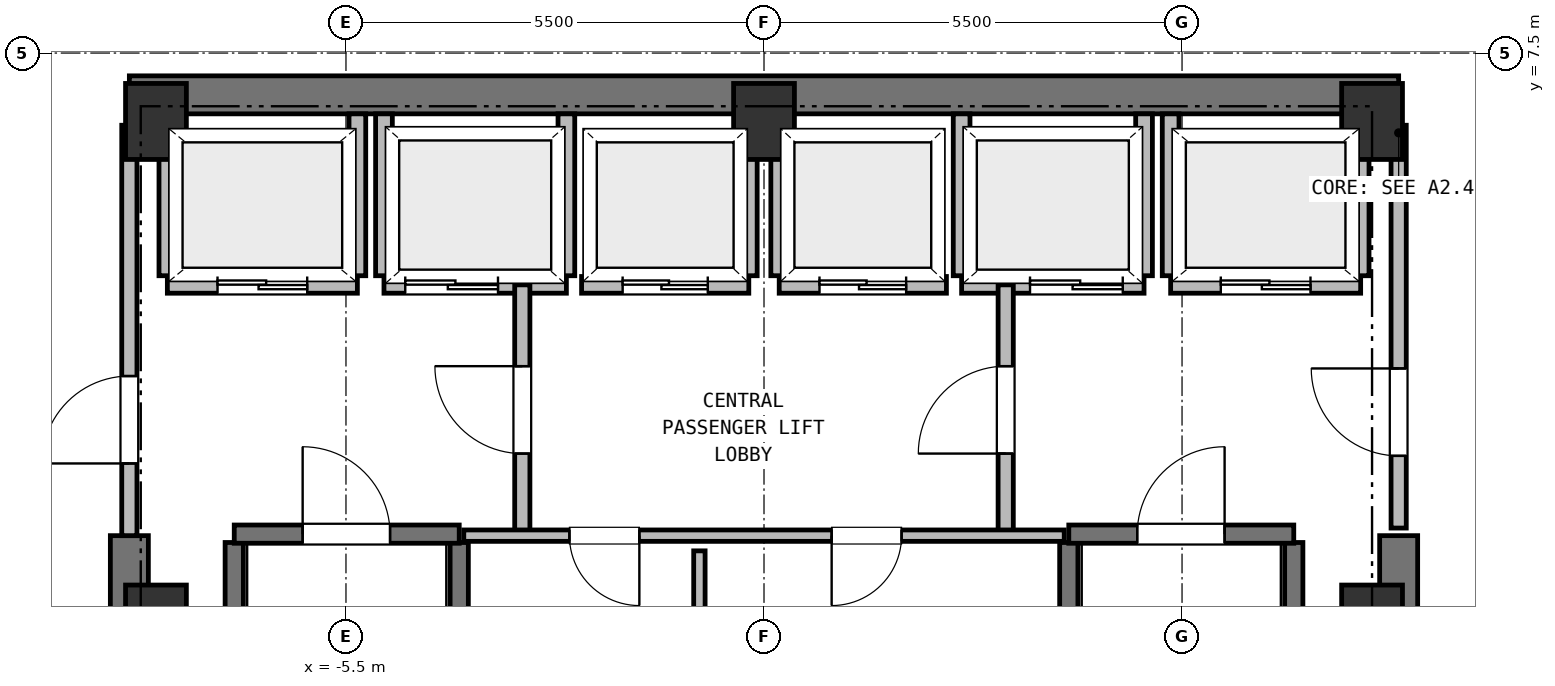
"""IFC4 building model, lengths in metres.
Left out: names, types, materials, properties, quantities, classifications, styles, units other than length and angle.
Written with IfcOpenShell. Run it as: python <this file> out.ifc"""

import sys

from ifc_helpers import new_model, si_unit, direction, frame, frame_2d, origin, origin_2d, place, context, subcontext, project, spatial, rectangle, extrude, element, fill, save


model = new_model("IFC4")
c1 = context("Model", 3, precision=1e-05, world=origin(), true_north=direction((0.0, 1.0)))
c2 = subcontext(c1, "Body", "Model", "MODEL_VIEW")
j1 = project(units=[si_unit("LENGTHUNIT", "METRE"), si_unit("PLANEANGLEUNIT", "RADIAN")], contexts=[c1])
p1 = place(None, origin())
s1 = spatial("IfcSite", under=j1, at=p1, CompositionType="ELEMENT")
p2 = place(p1, origin())
s2 = spatial("IfcBuilding", under=s1, at=p2, CompositionType="ELEMENT")
p3 = place(p2, frame((0.0, 0.0, 173.75)))
s3 = spatial("IfcBuildingStorey", under=s2, at=p3, CompositionType="ELEMENT", Elevation=173.75)
for number, where, z_axis, x_axis in (
    (1, (8.0, 0.0, 0.0), (0.0, 0.0, 1.0), (1.0, 0.0, 0.0)),
    (2, (8.0, 6.6, 0.0), (0.0, 0.0, 1.0), (1.0, 0.0, 0.0)),
    (3, (0.0, 6.6, 0.0), (0.0, 0.0, 1.0), (1.0, 0.0, 0.0)),
    (4, (-8.0, 6.6, 0.0), (0.0, 0.0, 1.0), (1.0, 0.0, 0.0)),
    (5, (-8.0, 0.0, 0.0), (0.0, 0.0, 1.0), (1.0, 0.0, 0.0)),
):
    element("IfcColumn", number, at=place(p3, frame(where, z_axis=z_axis, x_axis=x_axis)), inside=s3, PredefinedType="COLUMN", context=c2, shape_type="SweptSolid", body=[
        extrude(rectangle(XDim=0.8, YDim=1.0, at=origin_2d()), origin(), (0.0, 0.0, 1.0), 4.5),
    ])
p4 = place(p3, frame((-8.35, 6.95, 0.0), z_axis=(0.0, 0.0, 1.0), x_axis=(1.0, 0.0, 0.0)))
e6 = element("IfcWall", 6, at=p4, inside=s3, PredefinedType="SHEAR", context=c2, shape_type="SweptSolid", body=[
    extrude(rectangle(XDim=16.7, YDim=0.5, at=frame_2d((8.35, 0.0))), origin(), (0.0, 0.0, 1.0), 4.21),
])
for number, where, z_axis, x_axis in (
    (7, (-8.35, -6.95, 0.0), (0.0, 0.0, 1.0), (0.0, 1.0, 0.0)),
    (8, (8.35, -6.95, 0.0), (0.0, 0.0, 1.0), (0.0, 1.0, 0.0)),
):
    element("IfcWall", number, at=place(p3, frame(where, z_axis=z_axis, x_axis=x_axis)), inside=s3, PredefinedType="SHEAR", context=c2, shape_type="SweptSolid", body=[
        extrude(rectangle(XDim=8.1, YDim=0.5, at=frame_2d((4.05, 0.0))), origin(), (0.0, 0.0, 1.0), 4.21),
    ])
for number, where, z_axis, x_axis in (
    (9, (-6.97, -6.16, 0.0), (0.0, 0.0, 1.0), (0.0, 1.0, 0.0)),
    (10, (-4.01, -6.16, 0.0), (0.0, 0.0, 1.0), (0.0, 1.0, 0.0)),
):
    element("IfcWall", number, at=place(p3, frame(where, z_axis=z_axis, x_axis=x_axis)), inside=s3, PredefinedType="SHEAR", context=c2, shape_type="SweptSolid", body=[
        extrude(rectangle(XDim=7.22, YDim=0.24, at=frame_2d((3.61, 0.0))), origin(), (0.0, 0.0, 1.0), 4.21),
    ])
p5 = place(p3, frame((-6.97, 1.17, 0.0), z_axis=(0.0, 0.0, 1.0), x_axis=(1.0, 0.0, 0.0)))
e11 = element("IfcWall", 11, at=p5, inside=s3, PredefinedType="SHEAR", context=c2, shape_type="SweptSolid", body=[
    extrude(rectangle(XDim=2.96, YDim=0.24, at=frame_2d((1.48, 0.0))), origin(), (0.0, 0.0, 1.0), 4.21),
])
p6 = place(p5, frame((0.9, 0.0, 0.0)))
e12 = element("IfcOpeningElement", 12, at=p6, cuts=e11, PredefinedType="OPENING", context=c2, shape_type="SweptSolid", body=[
    extrude(rectangle(XDim=1.15, YDim=2.15, at=frame_2d((0.575, 1.075))), frame((0.0, 0.13, 0.0), z_axis=(0.0, -1.0, 0.0), x_axis=(1.0, 0.0, 0.0)), (0.0, 0.0, 1.0), 0.26),
])
for number, where, z_axis, x_axis in (
    (13, (4.01, -6.16, 0.0), (0.0, 0.0, 1.0), (0.0, 1.0, 0.0)),
    (14, (6.97, -6.16, 0.0), (0.0, 0.0, 1.0), (0.0, 1.0, 0.0)),
):
    element("IfcWall", number, at=place(p3, frame(where, z_axis=z_axis, x_axis=x_axis)), inside=s3, PredefinedType="SHEAR", context=c2, shape_type="SweptSolid", body=[
        extrude(rectangle(XDim=7.22, YDim=0.24, at=frame_2d((3.61, 0.0))), origin(), (0.0, 0.0, 1.0), 4.21),
    ])
p7 = place(p3, frame((4.01, 1.17, 0.0), z_axis=(0.0, 0.0, 1.0), x_axis=(1.0, 0.0, 0.0)))
e15 = element("IfcWall", 15, at=p7, inside=s3, PredefinedType="SHEAR", context=c2, shape_type="SweptSolid", body=[
    extrude(rectangle(XDim=2.96, YDim=0.24, at=frame_2d((1.48, 0.0))), origin(), (0.0, 0.0, 1.0), 4.21),
])
p8 = place(p7, frame((0.9, 0.0, 0.0)))
e16 = element("IfcOpeningElement", 16, at=p8, cuts=e15, PredefinedType="OPENING", context=c2, shape_type="SweptSolid", body=[
    extrude(rectangle(XDim=1.15, YDim=2.15, at=frame_2d((0.575, 1.075))), frame((0.0, 0.13, 0.0), z_axis=(0.0, -1.0, 0.0), x_axis=(1.0, 0.0, 0.0)), (0.0, 0.0, 1.0), 0.26),
])
p9 = place(p3, frame((-7.85, 4.45, 0.0), z_axis=(0.0, 0.0, 1.0), x_axis=(1.0, 0.0, 0.0)))
e17 = element("IfcWall", 17, at=p9, inside=s3, PredefinedType="PARTITIONING", context=c2, shape_type="SweptSolid", body=[
    extrude(rectangle(XDim=2.5, YDim=0.22, at=frame_2d((1.25, 0.0))), origin(), (0.0, 0.0, 1.0), 4.21),
])
p10 = place(p9, frame((0.66, 0.0, 0.0)))
e18 = element("IfcOpeningElement", 18, at=p10, cuts=e17, PredefinedType="OPENING", context=c2, shape_type="SweptSolid", body=[
    extrude(rectangle(XDim=1.18, YDim=2.15, at=frame_2d((0.59, 1.075))), frame((0.0, 0.12, 0.0), z_axis=(0.0, -1.0, 0.0), x_axis=(1.0, 0.0, 0.0)), (0.0, 0.0, 1.0), 0.24),
])
p11 = place(p3, frame((-7.85, 4.57, 0.0), z_axis=(0.0, 0.0, 1.0), x_axis=(0.0, 1.0, 0.0)))
e19 = element("IfcWall", 19, at=p11, inside=s3, PredefinedType="PARTITIONING", context=c2, shape_type="SweptSolid", body=[
    extrude(rectangle(XDim=2.13, YDim=0.22, at=frame_2d((1.065, 0.0))), origin(), (0.0, 0.0, 1.0), 3.84),
])
p12 = place(p3, frame((-5.35, 4.57, 0.0), z_axis=(0.0, 0.0, 1.0), x_axis=(0.0, 1.0, 0.0)))
e20 = element("IfcWall", 20, at=p12, inside=s3, PredefinedType="PARTITIONING", context=c2, shape_type="SweptSolid", body=[
    extrude(rectangle(XDim=2.13, YDim=0.22, at=frame_2d((1.065, 0.0))), origin(), (0.0, 0.0, 1.0), 4.21),
])
p13 = place(p3, frame((5.35, 4.45, 0.0), z_axis=(0.0, 0.0, 1.0), x_axis=(1.0, 0.0, 0.0)))
e21 = element("IfcWall", 21, at=p13, inside=s3, PredefinedType="PARTITIONING", context=c2, shape_type="SweptSolid", body=[
    extrude(rectangle(XDim=2.5, YDim=0.22, at=frame_2d((1.25, 0.0))), origin(), (0.0, 0.0, 1.0), 4.21),
])
p14 = place(p13, frame((0.66, 0.0, 0.0)))
e22 = element("IfcOpeningElement", 22, at=p14, cuts=e21, PredefinedType="OPENING", context=c2, shape_type="SweptSolid", body=[
    extrude(rectangle(XDim=1.18, YDim=2.15, at=frame_2d((0.59, 1.075))), frame((0.0, 0.12, 0.0), z_axis=(0.0, -1.0, 0.0), x_axis=(1.0, 0.0, 0.0)), (0.0, 0.0, 1.0), 0.24),
])
p15 = place(p3, frame((5.35, 4.57, 0.0), z_axis=(0.0, 0.0, 1.0), x_axis=(0.0, 1.0, 0.0)))
e23 = element("IfcWall", 23, at=p15, inside=s3, PredefinedType="PARTITIONING", context=c2, shape_type="SweptSolid", body=[
    extrude(rectangle(XDim=2.13, YDim=0.22, at=frame_2d((1.065, 0.0))), origin(), (0.0, 0.0, 1.0), 4.21),
])
p16 = place(p3, frame((7.85, 4.57, 0.0), z_axis=(0.0, 0.0, 1.0), x_axis=(0.0, 1.0, 0.0)))
e24 = element("IfcWall", 24, at=p16, inside=s3, PredefinedType="PARTITIONING", context=c2, shape_type="SweptSolid", body=[
    extrude(rectangle(XDim=2.13, YDim=0.22, at=frame_2d((1.065, 0.0))), origin(), (0.0, 0.0, 1.0), 3.84),
])
p17 = place(p3, frame((-5.0, 4.45, 0.0), z_axis=(0.0, 0.0, 1.0), x_axis=(1.0, 0.0, 0.0)))
e25 = element("IfcWall", 25, at=p17, inside=s3, PredefinedType="PARTITIONING", context=c2, shape_type="SweptSolid", body=[
    extrude(rectangle(XDim=2.4, YDim=0.22, at=frame_2d((1.2, 0.0))), origin(), (0.0, 0.0, 1.0), 4.21),
])
p18 = place(p17, frame((0.28, 0.0, 0.0)))
e26 = element("IfcOpeningElement", 26, at=p18, cuts=e25, PredefinedType="OPENING", context=c2, shape_type="SweptSolid", body=[
    extrude(rectangle(XDim=1.22, YDim=2.15, at=frame_2d((0.61, 1.075))), frame((0.0, 0.12, 0.0), z_axis=(0.0, -1.0, 0.0), x_axis=(1.0, 0.0, 0.0)), (0.0, 0.0, 1.0), 0.24),
])
for number, where, z_axis, x_axis in (
    (27, (-5.0, 4.57, 0.0), (0.0, 0.0, 1.0), (0.0, 1.0, 0.0)),
    (28, (-2.6, 4.57, 0.0), (0.0, 0.0, 1.0), (0.0, 1.0, 0.0)),
):
    element("IfcWall", number, at=place(p3, frame(where, z_axis=z_axis, x_axis=x_axis)), inside=s3, PredefinedType="PARTITIONING", context=c2, shape_type="SweptSolid", body=[
        extrude(rectangle(XDim=2.13, YDim=0.22, at=frame_2d((1.065, 0.0))), origin(), (0.0, 0.0, 1.0), 4.21),
    ])
p19 = place(p3, frame((2.6, 4.45, 0.0), z_axis=(0.0, 0.0, 1.0), x_axis=(1.0, 0.0, 0.0)))
e29 = element("IfcWall", 29, at=p19, inside=s3, PredefinedType="PARTITIONING", context=c2, shape_type="SweptSolid", body=[
    extrude(rectangle(XDim=2.4, YDim=0.22, at=frame_2d((1.2, 0.0))), origin(), (0.0, 0.0, 1.0), 4.21),
])
p20 = place(p19, frame((0.9, 0.0, 0.0)))
e30 = element("IfcOpeningElement", 30, at=p20, cuts=e29, PredefinedType="OPENING", context=c2, shape_type="SweptSolid", body=[
    extrude(rectangle(XDim=1.22, YDim=2.15, at=frame_2d((0.61, 1.075))), frame((0.0, 0.12, 0.0), z_axis=(0.0, -1.0, 0.0), x_axis=(1.0, 0.0, 0.0)), (0.0, 0.0, 1.0), 0.24),
])
for number, where, z_axis, x_axis in (
    (31, (2.6, 4.57, 0.0), (0.0, 0.0, 1.0), (0.0, 1.0, 0.0)),
    (32, (5.0, 4.57, 0.0), (0.0, 0.0, 1.0), (0.0, 1.0, 0.0)),
):
    element("IfcWall", number, at=place(p3, frame(where, z_axis=z_axis, x_axis=x_axis)), inside=s3, PredefinedType="PARTITIONING", context=c2, shape_type="SweptSolid", body=[
        extrude(rectangle(XDim=2.13, YDim=0.22, at=frame_2d((1.065, 0.0))), origin(), (0.0, 0.0, 1.0), 4.21),
    ])
p21 = place(p3, frame((-2.4, 4.45, 0.0), z_axis=(0.0, 0.0, 1.0), x_axis=(1.0, 0.0, 0.0)))
e33 = element("IfcWall", 33, at=p21, inside=s3, PredefinedType="PARTITIONING", context=c2, shape_type="SweptSolid", body=[
    extrude(rectangle(XDim=2.2, YDim=0.22, at=frame_2d((1.1, 0.0))), origin(), (0.0, 0.0, 1.0), 4.21),
])
p22 = place(p21, frame((0.54, 0.0, 0.0)))
e34 = element("IfcOpeningElement", 34, at=p22, cuts=e33, PredefinedType="OPENING", context=c2, shape_type="SweptSolid", body=[
    extrude(rectangle(XDim=1.12, YDim=2.15, at=frame_2d((0.56, 1.075))), frame((0.0, 0.12, 0.0), z_axis=(0.0, -1.0, 0.0), x_axis=(1.0, 0.0, 0.0)), (0.0, 0.0, 1.0), 0.24),
])
p23 = place(p3, frame((-0.2, 4.57, 0.0), z_axis=(0.0, 0.0, 1.0), x_axis=(0.0, 1.0, 0.0)))
e35 = element("IfcWall", 35, at=p23, inside=s3, PredefinedType="PARTITIONING", context=c2, shape_type="SweptSolid", body=[
    extrude(rectangle(XDim=2.13, YDim=0.22, at=frame_2d((1.065, 0.0))), origin(), (0.0, 0.0, 1.0), 4.21),
])
p24 = place(p3, frame((0.2, 4.45, 0.0), z_axis=(0.0, 0.0, 1.0), x_axis=(1.0, 0.0, 0.0)))
e36 = element("IfcWall", 36, at=p24, inside=s3, PredefinedType="PARTITIONING", context=c2, shape_type="SweptSolid", body=[
    extrude(rectangle(XDim=2.2, YDim=0.22, at=frame_2d((1.1, 0.0))), origin(), (0.0, 0.0, 1.0), 4.21),
])
p25 = place(p24, frame((0.53, 0.0, 0.0)))
e37 = element("IfcOpeningElement", 37, at=p25, cuts=e36, PredefinedType="OPENING", context=c2, shape_type="SweptSolid", body=[
    extrude(rectangle(XDim=1.14, YDim=2.15, at=frame_2d((0.57, 1.075))), frame((0.0, 0.12, 0.0), z_axis=(0.0, -1.0, 0.0), x_axis=(1.0, 0.0, 0.0)), (0.0, 0.0, 1.0), 0.24),
])
p26 = place(p3, frame((0.2, 4.57, 0.0), z_axis=(0.0, 0.0, 1.0), x_axis=(0.0, 1.0, 0.0)))
e38 = element("IfcWall", 38, at=p26, inside=s3, PredefinedType="PARTITIONING", context=c2, shape_type="SweptSolid", body=[
    extrude(rectangle(XDim=2.13, YDim=0.22, at=frame_2d((1.065, 0.0))), origin(), (0.0, 0.0, 1.0), 4.21),
])
p27 = place(p3, frame((-3.18, 1.15, 0.0), z_axis=(0.0, 0.0, 1.0), x_axis=(0.0, 1.0, 0.0)))
e39 = element("IfcWall", 39, at=p27, inside=s3, PredefinedType="PARTITIONING", context=c2, shape_type="SweptSolid", body=[
    extrude(rectangle(XDim=3.3, YDim=0.2, at=frame_2d((1.65, 0.0))), origin(), (0.0, 0.0, 1.0), 4.21),
])
p28 = place(p27, frame((1.08, 0.0, 0.0)))
e40 = element("IfcOpeningElement", 40, at=p28, cuts=e39, PredefinedType="OPENING", context=c2, shape_type="SweptSolid", body=[
    extrude(rectangle(XDim=1.15, YDim=2.15, at=frame_2d((0.575, 1.075))), frame((0.0, 0.11, 0.0), z_axis=(0.0, -1.0, 0.0), x_axis=(1.0, 0.0, 0.0)), (0.0, 0.0, 1.0), 0.22),
])
p29 = place(p3, frame((3.18, 1.15, 0.0), z_axis=(0.0, 0.0, 1.0), x_axis=(0.0, 1.0, 0.0)))
e41 = element("IfcWall", 41, at=p29, inside=s3, PredefinedType="PARTITIONING", context=c2, shape_type="SweptSolid", body=[
    extrude(rectangle(XDim=3.3, YDim=0.2, at=frame_2d((1.65, 0.0))), origin(), (0.0, 0.0, 1.0), 4.21),
])
p30 = place(p29, frame((1.08, 0.0, 0.0)))
e42 = element("IfcOpeningElement", 42, at=p30, cuts=e41, PredefinedType="OPENING", context=c2, shape_type="SweptSolid", body=[
    extrude(rectangle(XDim=1.15, YDim=2.15, at=frame_2d((0.575, 1.075))), frame((0.0, 0.11, 0.0), z_axis=(0.0, -1.0, 0.0), x_axis=(1.0, 0.0, 0.0)), (0.0, 0.0, 1.0), 0.22),
])
p31 = place(p3, frame((-8.35, 1.15, 0.0), z_axis=(0.0, 0.0, 1.0), x_axis=(0.0, 1.0, 0.0)))
e43 = element("IfcWall", 43, at=p31, inside=s3, PredefinedType="PARTITIONING", context=c2, shape_type="SweptSolid", body=[
    extrude(rectangle(XDim=5.4, YDim=0.2, at=frame_2d((2.7, 0.0))), origin(), (0.0, 0.0, 1.0), 4.21),
])
p32 = place(p31, frame((0.95, 0.0, 0.0)))
e44 = element("IfcOpeningElement", 44, at=p32, cuts=e43, PredefinedType="OPENING", context=c2, shape_type="SweptSolid", body=[
    extrude(rectangle(XDim=1.15, YDim=2.15, at=frame_2d((0.575, 1.075))), frame((0.0, 0.11, 0.0), z_axis=(0.0, -1.0, 0.0), x_axis=(1.0, 0.0, 0.0)), (0.0, 0.0, 1.0), 0.22),
])
p33 = place(p3, frame((8.35, 1.25, 0.0), z_axis=(0.0, 0.0, 1.0), x_axis=(0.0, 1.0, 0.0)))
e45 = element("IfcWall", 45, at=p33, inside=s3, PredefinedType="PARTITIONING", context=c2, shape_type="SweptSolid", body=[
    extrude(rectangle(XDim=5.3, YDim=0.2, at=frame_2d((2.65, 0.0))), origin(), (0.0, 0.0, 1.0), 4.21),
])
p34 = place(p33, frame((0.95, 0.0, 0.0)))
e46 = element("IfcOpeningElement", 46, at=p34, cuts=e45, PredefinedType="OPENING", context=c2, shape_type="SweptSolid", body=[
    extrude(rectangle(XDim=1.15, YDim=2.15, at=frame_2d((0.575, 1.075))), frame((0.0, 0.11, 0.0), z_axis=(0.0, -1.0, 0.0), x_axis=(1.0, 0.0, 0.0)), (0.0, 0.0, 1.0), 0.22),
])
p35 = place(p3, frame((3.95, 1.15, 0.0), z_axis=(0.0, 0.0, 1.0), x_axis=(-1.0, 0.0, 0.0)))
e47 = element("IfcWall", 47, at=p35, inside=s3, PredefinedType="PARTITIONING", context=c2, shape_type="SweptSolid", body=[
    extrude(rectangle(XDim=7.9, YDim=0.15, at=frame_2d((3.95, 0.0))), origin(), (0.0, 0.0, 1.0), 4.21),
])
p36 = place(p35, frame((5.59, 0.0, 0.0)))
e48 = element("IfcOpeningElement", 48, at=p36, cuts=e47, PredefinedType="OPENING", context=c2, shape_type="SweptSolid", body=[
    extrude(rectangle(XDim=0.92, YDim=2.05, at=frame_2d((0.46, 1.025))), frame((0.0, 0.085, 0.0), z_axis=(0.0, -1.0, 0.0), x_axis=(1.0, 0.0, 0.0)), (0.0, 0.0, 1.0), 0.17),
])
p37 = place(p35, frame((2.14, 0.0, 0.0)))
e49 = element("IfcOpeningElement", 49, at=p37, cuts=e47, PredefinedType="OPENING", context=c2, shape_type="SweptSolid", body=[
    extrude(rectangle(XDim=0.92, YDim=2.05, at=frame_2d((0.46, 1.025))), frame((0.0, 0.085, 0.0), z_axis=(0.0, -1.0, 0.0), x_axis=(1.0, 0.0, 0.0)), (0.0, 0.0, 1.0), 0.17),
])
p38 = place(p3, frame((-0.85, -6.58, 0.0), z_axis=(0.0, 0.0, 1.0), x_axis=(0.0, 1.0, 0.0)))
e50 = element("IfcWall", 50, at=p38, inside=s3, PredefinedType="PARTITIONING", context=c2, shape_type="SweptSolid", body=[
    extrude(rectangle(XDim=7.53, YDim=0.15, at=frame_2d((3.765, 0.0))), origin(), (0.0, 0.0, 1.0), 4.21),
])
for number, where, z_axis, x_axis in (
    (51, (8.648, 9.171, 0.0), (0.0, 0.0, 1.0), (0.69, -0.724, 0.0)),
    (52, (-10.422, 7.309, 0.0), (0.0, 0.0, 1.0), (0.69, 0.724, 0.0)),
):
    element("IfcWall", number, at=place(p3, frame(where, z_axis=z_axis, x_axis=x_axis)), inside=s3, PredefinedType="PARTITIONING", context=c2, shape_type="SweptSolid", body=[
        extrude(rectangle(XDim=2.572, YDim=0.15, at=frame_2d((1.286, 0.0))), origin(), (0.0, 0.0, 1.0), 4.21),
    ])
p39 = place(p6, origin())
e53 = element("IfcDoor", 53, at=p39, inside=s3, OperationType="SINGLE_SWING_LEFT", PredefinedType="DOOR", context=c2, shape_type="SweptSolid", body=[
    extrude(rectangle(XDim=1.15, YDim=2.15, at=frame_2d((0.575, 1.075))), frame((0.0, 0.025, 0.0), z_axis=(0.0, -1.0, 0.0), x_axis=(1.0, 0.0, 0.0)), (0.0, 0.0, 1.0), 0.05),
])
fill(e12, e53)
p40 = place(p8, origin())
e54 = element("IfcDoor", 54, at=p40, inside=s3, OperationType="SINGLE_SWING_RIGHT", PredefinedType="DOOR", context=c2, shape_type="SweptSolid", body=[
    extrude(rectangle(XDim=1.15, YDim=2.15, at=frame_2d((0.575, 1.075))), frame((0.0, 0.025, 0.0), z_axis=(0.0, -1.0, 0.0), x_axis=(1.0, 0.0, 0.0)), (0.0, 0.0, 1.0), 0.05),
])
fill(e16, e54)
p41 = place(p10, origin())
e55 = element("IfcDoor", 55, at=p41, inside=s3, OperationType="DOUBLE_DOOR_SLIDING", PredefinedType="DOOR", context=c2, shape_type="SweptSolid", body=[
    extrude(rectangle(XDim=1.18, YDim=2.15, at=frame_2d((0.59, 1.075))), frame((0.0, 0.025, 0.0), z_axis=(0.0, -1.0, 0.0), x_axis=(1.0, 0.0, 0.0)), (0.0, 0.0, 1.0), 0.05),
])
fill(e18, e55)
p42 = place(p14, origin())
e56 = element("IfcDoor", 56, at=p42, inside=s3, OperationType="DOUBLE_DOOR_SLIDING", PredefinedType="DOOR", context=c2, shape_type="SweptSolid", body=[
    extrude(rectangle(XDim=1.18, YDim=2.15, at=frame_2d((0.59, 1.075))), frame((0.0, 0.025, 0.0), z_axis=(0.0, -1.0, 0.0), x_axis=(1.0, 0.0, 0.0)), (0.0, 0.0, 1.0), 0.05),
])
fill(e22, e56)
p43 = place(p18, origin())
e57 = element("IfcDoor", 57, at=p43, inside=s3, OperationType="DOUBLE_DOOR_SLIDING", PredefinedType="DOOR", context=c2, shape_type="SweptSolid", body=[
    extrude(rectangle(XDim=1.22, YDim=2.15, at=frame_2d((0.61, 1.075))), frame((0.0, 0.025, 0.0), z_axis=(0.0, -1.0, 0.0), x_axis=(1.0, 0.0, 0.0)), (0.0, 0.0, 1.0), 0.05),
])
fill(e26, e57)
p44 = place(p20, origin())
e58 = element("IfcDoor", 58, at=p44, inside=s3, OperationType="DOUBLE_DOOR_SLIDING", PredefinedType="DOOR", context=c2, shape_type="SweptSolid", body=[
    extrude(rectangle(XDim=1.22, YDim=2.15, at=frame_2d((0.61, 1.075))), frame((0.0, 0.025, 0.0), z_axis=(0.0, -1.0, 0.0), x_axis=(1.0, 0.0, 0.0)), (0.0, 0.0, 1.0), 0.05),
])
fill(e30, e58)
p45 = place(p22, origin())
e59 = element("IfcDoor", 59, at=p45, inside=s3, OperationType="DOUBLE_DOOR_SLIDING", PredefinedType="DOOR", context=c2, shape_type="SweptSolid", body=[
    extrude(rectangle(XDim=1.12, YDim=2.15, at=frame_2d((0.56, 1.075))), frame((0.0, 0.025, 0.0), z_axis=(0.0, -1.0, 0.0), x_axis=(1.0, 0.0, 0.0)), (0.0, 0.0, 1.0), 0.05),
])
fill(e34, e59)
p46 = place(p25, origin())
e60 = element("IfcDoor", 60, at=p46, inside=s3, OperationType="DOUBLE_DOOR_SLIDING", PredefinedType="DOOR", context=c2, shape_type="SweptSolid", body=[
    extrude(rectangle(XDim=1.14, YDim=2.15, at=frame_2d((0.57, 1.075))), frame((0.0, 0.025, 0.0), z_axis=(0.0, -1.0, 0.0), x_axis=(1.0, 0.0, 0.0)), (0.0, 0.0, 1.0), 0.05),
])
fill(e37, e60)
p47 = place(p28, origin())
e61 = element("IfcDoor", 61, at=p47, inside=s3, OperationType="SINGLE_SWING_RIGHT", PredefinedType="DOOR", context=c2, shape_type="SweptSolid", body=[
    extrude(rectangle(XDim=1.15, YDim=2.15, at=frame_2d((0.575, 1.075))), frame((0.0, 0.025, 0.0), z_axis=(0.0, -1.0, 0.0), x_axis=(1.0, 0.0, 0.0)), (0.0, 0.0, 1.0), 0.05),
])
fill(e40, e61)
p48 = place(p30, origin())
e62 = element("IfcDoor", 62, at=p48, inside=s3, OperationType="SINGLE_SWING_LEFT", PredefinedType="DOOR", context=c2, shape_type="SweptSolid", body=[
    extrude(rectangle(XDim=1.15, YDim=2.15, at=frame_2d((0.575, 1.075))), frame((0.0, 0.025, 0.0), z_axis=(0.0, -1.0, 0.0), x_axis=(1.0, 0.0, 0.0)), (0.0, 0.0, 1.0), 0.05),
])
fill(e42, e62)
p49 = place(p32, origin())
e63 = element("IfcDoor", 63, at=p49, inside=s3, OperationType="SINGLE_SWING_LEFT", PredefinedType="DOOR", context=c2, shape_type="SweptSolid", body=[
    extrude(rectangle(XDim=1.15, YDim=2.15, at=frame_2d((0.575, 1.075))), frame((0.0, 0.025, 0.0), z_axis=(0.0, -1.0, 0.0), x_axis=(1.0, 0.0, 0.0)), (0.0, 0.0, 1.0), 0.05),
])
fill(e44, e63)
p50 = place(p34, origin())
e64 = element("IfcDoor", 64, at=p50, inside=s3, OperationType="SINGLE_SWING_RIGHT", PredefinedType="DOOR", context=c2, shape_type="SweptSolid", body=[
    extrude(rectangle(XDim=1.15, YDim=2.15, at=frame_2d((0.575, 1.075))), frame((0.0, 0.025, 0.0), z_axis=(0.0, -1.0, 0.0), x_axis=(1.0, 0.0, 0.0)), (0.0, 0.0, 1.0), 0.05),
])
fill(e46, e64)
p51 = place(p36, origin())
e65 = element("IfcDoor", 65, at=p51, inside=s3, OperationType="SINGLE_SWING_LEFT", PredefinedType="DOOR", context=c2, shape_type="SweptSolid", body=[
    extrude(rectangle(XDim=0.92, YDim=2.05, at=frame_2d((0.46, 1.025))), frame((0.0, 0.025, 0.0), z_axis=(0.0, -1.0, 0.0), x_axis=(1.0, 0.0, 0.0)), (0.0, 0.0, 1.0), 0.05),
])
fill(e48, e65)
p52 = place(p37, origin())
e66 = element("IfcDoor", 66, at=p52, inside=s3, OperationType="SINGLE_SWING_RIGHT", PredefinedType="DOOR", context=c2, shape_type="SweptSolid", body=[
    extrude(rectangle(XDim=0.92, YDim=2.05, at=frame_2d((0.46, 1.025))), frame((0.0, 0.025, 0.0), z_axis=(0.0, -1.0, 0.0), x_axis=(1.0, 0.0, 0.0)), (0.0, 0.0, 1.0), 0.05),
])
fill(e49, e66)
save(model, sys.argv[1])
